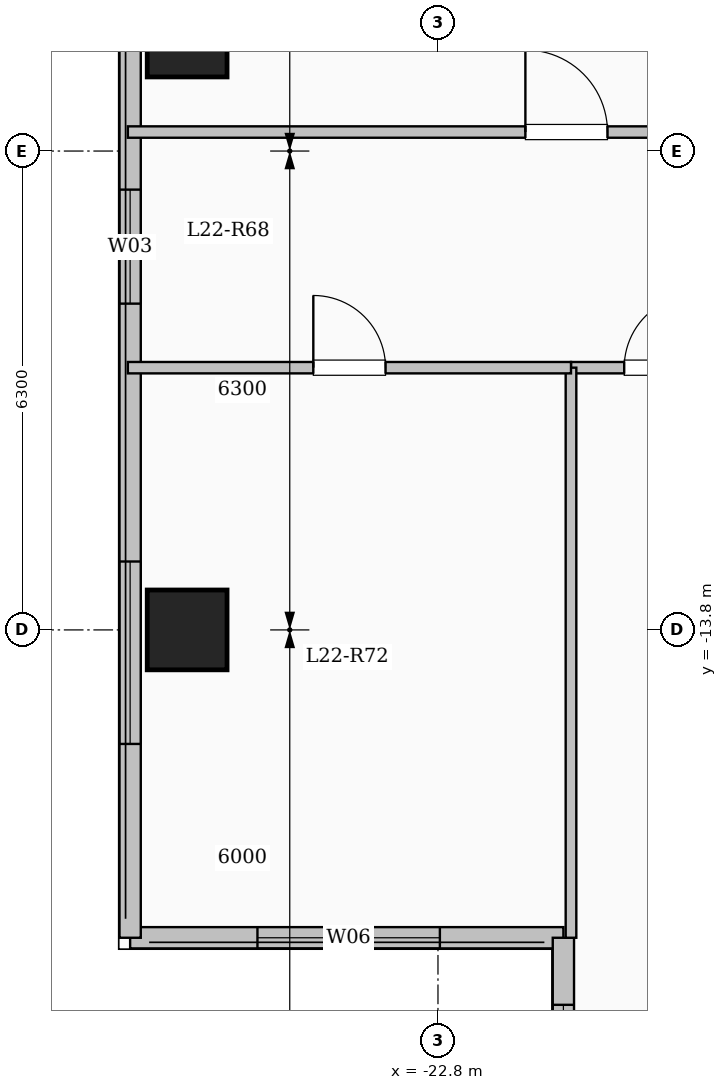
"""IFC4 building model, lengths in metres.
Left out: names, types, materials, properties, quantities, classifications, styles, units other than length and angle.
Written with IfcOpenShell. Run it as: python <this file> out.ifc"""

import sys

from ifc_helpers import new_model, si_unit, direction, frame, frame_2d, origin, origin_2d, place, context, subcontext, project, spatial, rectangle, extrude, element, fill, save


model = new_model("IFC4")
c1 = context("Model", 3, precision=1e-05, world=origin(), true_north=direction((0.0, 1.0)))
c2 = subcontext(c1, "Body", "Model", "MODEL_VIEW")
j1 = project(units=[si_unit("LENGTHUNIT", "METRE"), si_unit("PLANEANGLEUNIT", "RADIAN")], contexts=[c1])
p1 = place(None, origin())
s1 = spatial("IfcSite", under=j1, at=p1, CompositionType="ELEMENT")
p2 = place(p1, origin())
s2 = spatial("IfcBuilding", under=s1, at=p2, CompositionType="ELEMENT")
p3 = place(p2, frame((0.0, 0.0, 85.0)))
s3 = spatial("IfcBuildingStorey", under=s2, at=p3, CompositionType="ELEMENT", Elevation=85.0)
for number, where, z_axis, x_axis in (
    (1, (-26.1, -13.8, 0.0), (0.0, 0.0, 1.0), (1.0, 0.0, 0.0)),
    (2, (-26.1, -6.0, 0.0), (0.0, 0.0, 1.0), (1.0, 0.0, 0.0)),
):
    element("IfcColumn", number, at=place(p3, frame(where, z_axis=z_axis, x_axis=x_axis)), inside=s3, PredefinedType="COLUMN", context=c2, shape_type="SweptSolid", body=[
        extrude(rectangle(XDim=1.05, YDim=1.05, at=origin_2d()), origin(), (0.0, 0.0, 1.0), 3.35),
    ])
p4 = place(p3, frame((-21.15, -17.85, 0.0), z_axis=(0.0, 0.0, 1.0), x_axis=(-1.0, 0.0, 0.0)))
e3 = element("IfcWall", 3, at=p4, inside=s3, PredefinedType="SOLIDWALL", context=c2, shape_type="SweptSolid", body=[
    extrude(rectangle(XDim=5.7, YDim=0.28, at=frame_2d((2.85, 0.0))), origin(), (0.0, 0.0, 1.0), 3.1),
])
p5 = place(p4, frame((1.625, 0.0, 0.9)))
e4 = element("IfcOpeningElement", 4, at=p5, cuts=e3, PredefinedType="OPENING", context=c2, shape_type="SweptSolid", body=[
    extrude(rectangle(XDim=2.4, YDim=1.8, at=frame_2d((1.2, 0.9))), frame((0.0, 0.15, 0.0), z_axis=(0.0, -1.0, 0.0), x_axis=(1.0, 0.0, 0.0)), (0.0, 0.0, 1.0), 0.3),
])
p6 = place(p3, frame((-26.85, -17.85, 0.0), z_axis=(0.0, 0.0, 1.0), x_axis=(0.0, 1.0, 0.0)))
e5 = element("IfcWall", 5, at=p6, inside=s3, PredefinedType="SOLIDWALL", context=c2, shape_type="SweptSolid", body=[
    extrude(rectangle(XDim=35.7, YDim=0.28, at=frame_2d((17.85, 0.0))), origin(), (0.0, 0.0, 1.0), 3.1),
])
p7 = place(p6, frame((2.55, 0.0, 0.9)))
e6 = element("IfcOpeningElement", 6, at=p7, cuts=e5, PredefinedType="OPENING", context=c2, shape_type="SweptSolid", body=[
    extrude(rectangle(XDim=2.4, YDim=1.8, at=frame_2d((1.2, 0.9))), frame((0.0, 0.15, 0.0), z_axis=(0.0, -1.0, 0.0), x_axis=(1.0, 0.0, 0.0)), (0.0, 0.0, 1.0), 0.3),
])
p8 = place(p6, frame((8.343, 0.0, 0.9)))
e7 = element("IfcOpeningElement", 7, at=p8, cuts=e5, PredefinedType="OPENING", context=c2, shape_type="SweptSolid", body=[
    extrude(rectangle(XDim=1.5, YDim=1.65, at=frame_2d((0.75, 0.825))), frame((0.0, 0.15, 0.0), z_axis=(0.0, -1.0, 0.0), x_axis=(1.0, 0.0, 0.0)), (0.0, 0.0, 1.0), 0.3),
])
p9 = place(p6, frame((18.6, 0.0, 0.9)))
e8 = element("IfcOpeningElement", 8, at=p9, cuts=e5, PredefinedType="OPENING", context=c2, shape_type="SweptSolid", body=[
    extrude(rectangle(XDim=2.0, YDim=1.7, at=frame_2d((1.0, 0.85))), frame((0.0, 0.15, 0.0), z_axis=(0.0, -1.0, 0.0), x_axis=(1.0, 0.0, 0.0)), (0.0, 0.0, 1.0), 0.3),
])
p10 = place(p6, frame((28.975, 0.0, 0.95)))
e9 = element("IfcOpeningElement", 9, at=p10, cuts=e5, PredefinedType="OPENING", context=c2, shape_type="SweptSolid", body=[
    extrude(rectangle(XDim=1.0, YDim=1.5, at=frame_2d((0.5, 0.75))), frame((0.0, 0.15, 0.0), z_axis=(0.0, -1.0, 0.0), x_axis=(1.0, 0.0, 0.0)), (0.0, 0.0, 1.0), 0.3),
])
p11 = place(p6, frame((32.025, 0.0, 0.9)))
e10 = element("IfcOpeningElement", 10, at=p11, cuts=e5, PredefinedType="OPENING", context=c2, shape_type="SweptSolid", body=[
    extrude(rectangle(XDim=2.0, YDim=1.7, at=frame_2d((1.0, 0.85))), frame((0.0, 0.15, 0.0), z_axis=(0.0, -1.0, 0.0), x_axis=(1.0, 0.0, 0.0)), (0.0, 0.0, 1.0), 0.3),
])
p12 = place(p3, frame((-21.15, -22.05, 0.0), z_axis=(0.0, 0.0, 1.0), x_axis=(0.0, 1.0, 0.0)))
e11 = element("IfcWall", 11, at=p12, inside=s3, PredefinedType="SOLIDWALL", context=c2, shape_type="SweptSolid", body=[
    extrude(rectangle(XDim=4.2, YDim=0.28, at=frame_2d((2.1, 0.0))), origin(), (0.0, 0.0, 1.0), 3.1),
])
p13 = place(p12, frame((0.918, 0.0, 0.9)))
e12 = element("IfcOpeningElement", 12, at=p13, cuts=e11, PredefinedType="OPENING", context=c2, shape_type="SweptSolid", body=[
    extrude(rectangle(XDim=2.4, YDim=1.8, at=frame_2d((1.2, 0.9))), frame((0.0, 0.15, 0.0), z_axis=(0.0, -1.0, 0.0), x_axis=(1.0, 0.0, 0.0)), (0.0, 0.0, 1.0), 0.3),
])
p14 = place(p3, frame((-21.05, -10.35, 0.0), z_axis=(0.0, 0.0, 1.0), x_axis=(1.0, 0.0, 0.0)))
e13 = element("IfcWall", 13, at=p14, inside=s3, PredefinedType="PARTITIONING", context=c2, shape_type="SweptSolid", body=[
    extrude(rectangle(XDim=12.5, YDim=0.15, at=frame_2d((6.25, 0.0))), origin(), (0.0, 0.0, 1.0), 3.1),
])
p15 = place(p14, frame((0.7, 0.0, 0.0)))
e14 = element("IfcOpeningElement", 14, at=p15, cuts=e13, PredefinedType="OPENING", context=c2, shape_type="SweptSolid", body=[
    extrude(rectangle(XDim=0.96, YDim=2.15, at=frame_2d((0.48, 1.075))), frame((0.0, 0.085, 0.0), z_axis=(0.0, -1.0, 0.0), x_axis=(1.0, 0.0, 0.0)), (0.0, 0.0, 1.0), 0.17),
])
p16 = place(p3, frame((-26.88, -7.25, 0.0), z_axis=(0.0, 0.0, 1.0), x_axis=(1.0, 0.0, 0.0)))
e15 = element("IfcWall", 15, at=p16, inside=s3, PredefinedType="PARTITIONING", context=c2, shape_type="SweptSolid", body=[
    extrude(rectangle(XDim=8.43, YDim=0.15, at=frame_2d((4.215, 0.0))), origin(), (0.0, 0.0, 1.0), 3.1),
])
p17 = place(p16, frame((5.23, 0.0, 0.0)))
e16 = element("IfcOpeningElement", 16, at=p17, cuts=e15, PredefinedType="OPENING", context=c2, shape_type="SweptSolid", body=[
    extrude(rectangle(XDim=1.08, YDim=2.15, at=frame_2d((0.54, 1.075))), frame((0.0, 0.085, 0.0), z_axis=(0.0, -1.0, 0.0), x_axis=(1.0, 0.0, 0.0)), (0.0, 0.0, 1.0), 0.17),
])
p18 = place(p3, frame((-21.05, -17.85, 0.0), z_axis=(0.0, 0.0, 1.0), x_axis=(0.0, 1.0, 0.0)))
e17 = element("IfcWall", 17, at=p18, inside=s3, PredefinedType="PARTITIONING", context=c2, shape_type="SweptSolid", body=[
    extrude(rectangle(XDim=7.5, YDim=0.14, at=frame_2d((3.75, 0.0))), origin(), (0.0, 0.0, 1.0), 3.1),
])
p19 = place(p3, frame((-26.88, -10.35, 0.0), z_axis=(0.0, 0.0, 1.0), x_axis=(1.0, 0.0, 0.0)))
e18 = element("IfcWall", 18, at=p19, inside=s3, PredefinedType="PARTITIONING", context=c2, shape_type="SweptSolid", body=[
    extrude(rectangle(XDim=5.83, YDim=0.15, at=frame_2d((2.915, 0.0))), origin(), (0.0, 0.0, 1.0), 3.1),
])
p20 = place(p19, frame((2.44, 0.0, 0.0)))
e19 = element("IfcOpeningElement", 19, at=p20, cuts=e18, PredefinedType="OPENING", context=c2, shape_type="SweptSolid", body=[
    extrude(rectangle(XDim=0.95, YDim=2.15, at=frame_2d((0.475, 1.075))), frame((0.0, 0.085, 0.0), z_axis=(0.0, -1.0, 0.0), x_axis=(1.0, 0.0, 0.0)), (0.0, 0.0, 1.0), 0.17),
])
p21 = place(p5, origin())
e20 = element("IfcWindow", 20, at=p21, inside=s3, PartitioningType="SINGLE_PANEL", PredefinedType="WINDOW", context=c2, shape_type="SweptSolid", body=[
    extrude(rectangle(XDim=2.4, YDim=1.8, at=frame_2d((1.2, 0.9))), frame((0.0, 0.03, 0.0), z_axis=(0.0, -1.0, 0.0), x_axis=(1.0, 0.0, 0.0)), (0.0, 0.0, 1.0), 0.06),
])
fill(e4, e20)
p22 = place(p7, origin())
e21 = element("IfcWindow", 21, at=p22, inside=s3, PartitioningType="SINGLE_PANEL", PredefinedType="WINDOW", context=c2, shape_type="SweptSolid", body=[
    extrude(rectangle(XDim=2.4, YDim=1.8, at=frame_2d((1.2, 0.9))), frame((0.0, 0.03, 0.0), z_axis=(0.0, -1.0, 0.0), x_axis=(1.0, 0.0, 0.0)), (0.0, 0.0, 1.0), 0.06),
])
fill(e6, e21)
p23 = place(p8, origin())
e22 = element("IfcWindow", 22, at=p23, inside=s3, PartitioningType="SINGLE_PANEL", PredefinedType="WINDOW", context=c2, shape_type="SweptSolid", body=[
    extrude(rectangle(XDim=1.5, YDim=1.65, at=frame_2d((0.75, 0.825))), frame((0.0, 0.03, 0.0), z_axis=(0.0, -1.0, 0.0), x_axis=(1.0, 0.0, 0.0)), (0.0, 0.0, 1.0), 0.06),
])
fill(e7, e22)
p24 = place(p13, origin())
e23 = element("IfcWindow", 23, at=p24, inside=s3, PartitioningType="SINGLE_PANEL", PredefinedType="WINDOW", context=c2, shape_type="SweptSolid", body=[
    extrude(rectangle(XDim=2.4, YDim=1.8, at=frame_2d((1.2, 0.9))), frame((0.0, 0.03, 0.0), z_axis=(0.0, -1.0, 0.0), x_axis=(1.0, 0.0, 0.0)), (0.0, 0.0, 1.0), 0.06),
])
fill(e12, e23)
p25 = place(p15, origin())
e24 = element("IfcDoor", 24, at=p25, inside=s3, OperationType="SINGLE_SWING_RIGHT", PredefinedType="DOOR", context=c2, shape_type="SweptSolid", body=[
    extrude(rectangle(XDim=0.96, YDim=2.15, at=frame_2d((0.48, 1.075))), frame((0.0, 0.025, 0.0), z_axis=(0.0, -1.0, 0.0), x_axis=(1.0, 0.0, 0.0)), (0.0, 0.0, 1.0), 0.05),
])
fill(e14, e24)
p26 = place(p20, origin())
e25 = element("IfcDoor", 25, at=p26, inside=s3, OperationType="SINGLE_SWING_LEFT", PredefinedType="DOOR", context=c2, shape_type="SweptSolid", body=[
    extrude(rectangle(XDim=0.95, YDim=2.15, at=frame_2d((0.475, 1.075))), frame((0.0, 0.025, 0.0), z_axis=(0.0, -1.0, 0.0), x_axis=(1.0, 0.0, 0.0)), (0.0, 0.0, 1.0), 0.05),
])
fill(e19, e25)
p27 = place(p17, origin())
e26 = element("IfcDoor", 26, at=p27, inside=s3, OperationType="SINGLE_SWING_LEFT", PredefinedType="DOOR", context=c2, shape_type="SweptSolid", body=[
    extrude(rectangle(XDim=1.08, YDim=2.15, at=frame_2d((0.54, 1.075))), frame((0.0, 0.025, 0.0), z_axis=(0.0, -1.0, 0.0), x_axis=(1.0, 0.0, 0.0)), (0.0, 0.0, 1.0), 0.05),
])
fill(e16, e26)
save(model, sys.argv[1])
